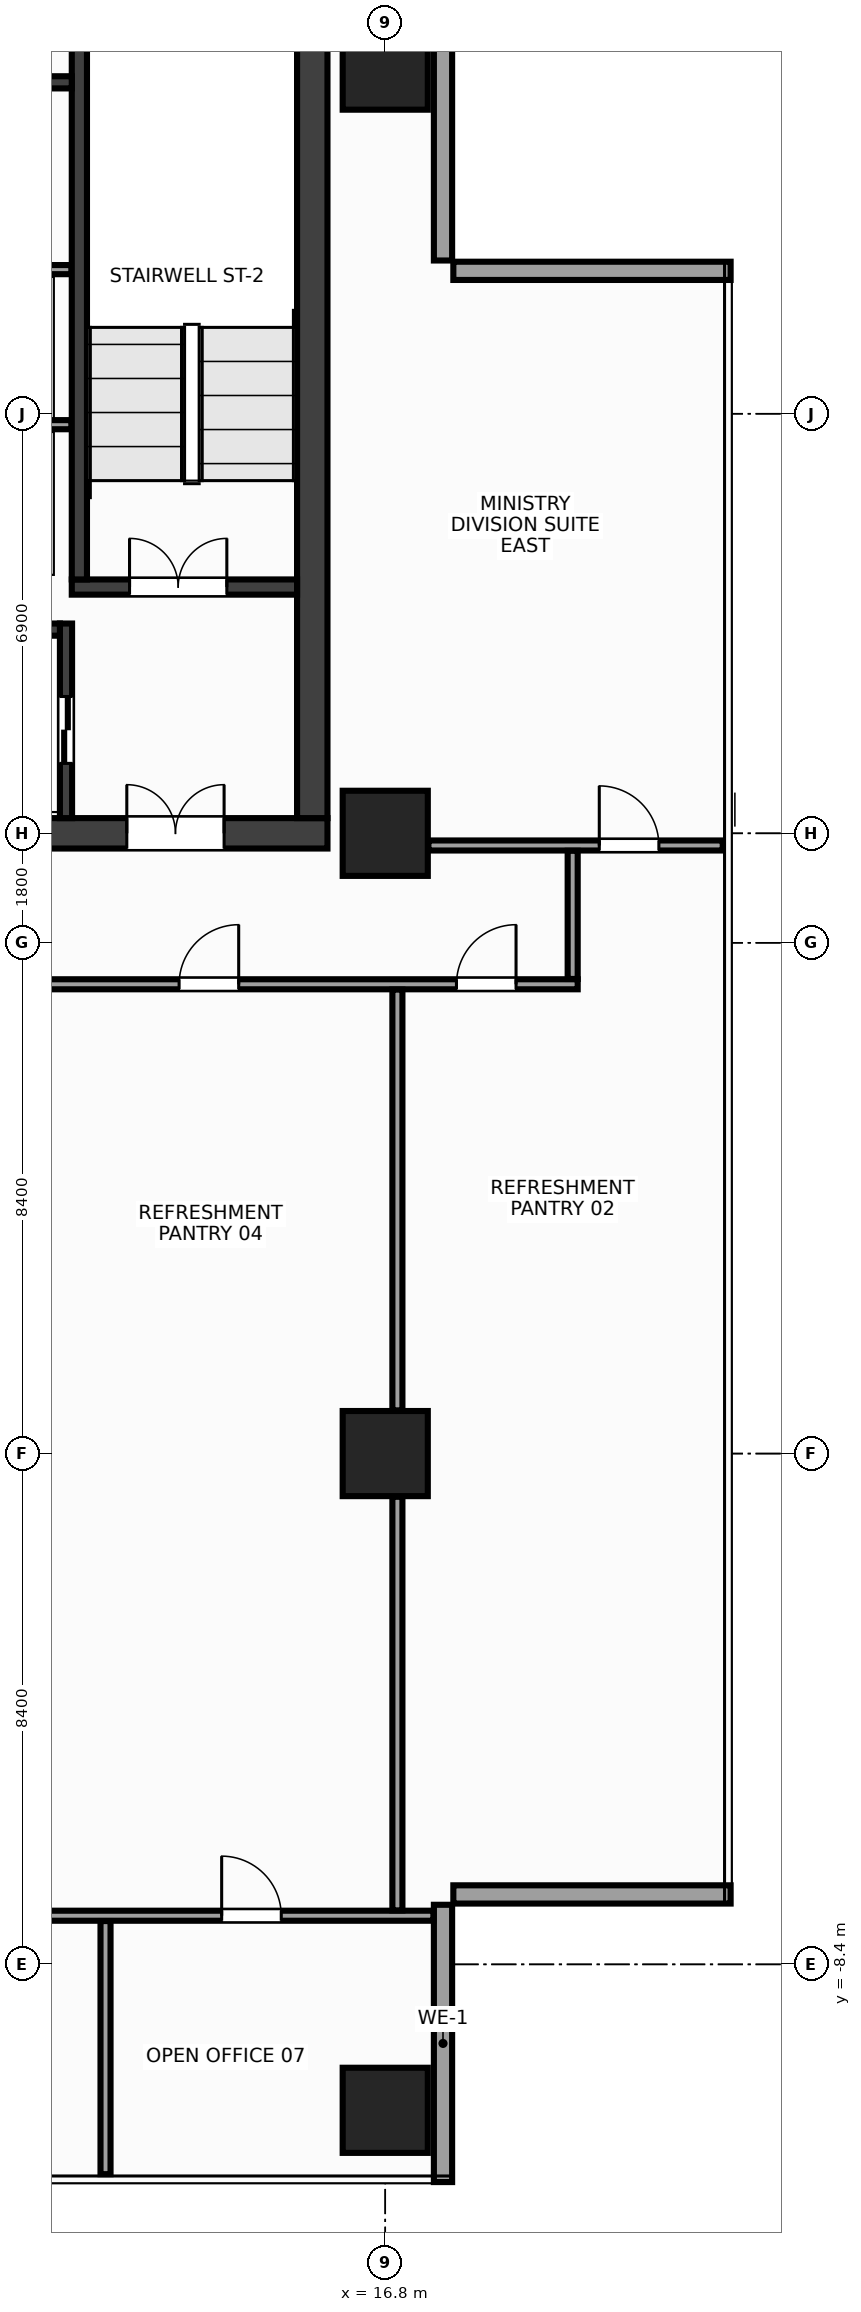
"""IFC4 building model, lengths in metres.
Left out: names, types, materials, properties, quantities, classifications, styles, units other than length and angle.
Written with IfcOpenShell. Run it as: python <this file> out.ifc"""

import sys

from ifc_helpers import new_model, si_unit, direction, frame, frame_2d, origin, origin_2d, place, context, subcontext, project, spatial, rectangle, extrude, source, transform, mapped, element, fill, save


model = new_model("IFC4")
c1 = context("Model", 3, precision=1e-05, world=origin(), true_north=direction((0.0, 1.0)))
c2 = subcontext(c1, "Body", "Model", "MODEL_VIEW")
j1 = project(units=[si_unit("LENGTHUNIT", "METRE"), si_unit("PLANEANGLEUNIT", "RADIAN")], contexts=[c1])
p1 = place(None, origin())
s1 = spatial("IfcSite", under=j1, at=p1, CompositionType="ELEMENT")
p2 = place(p1, origin())
s2 = spatial("IfcBuilding", under=s1, at=p2, CompositionType="ELEMENT")
p3 = place(p2, frame((0.0, 0.0, 254.0)))
s3 = spatial("IfcBuildingStorey", under=s2, at=p3, CompositionType="ELEMENT", Elevation=254.0)
m1 = source(origin(), c2, "Body", "SweptSolid", [
    extrude(rectangle(XDim=31.7, YDim=0.5, at=frame_2d((15.85, 0.0))), origin(), (0.0, 0.0, 1.0), 3.6),
])
p4 = place(p3, frame((-15.85, 10.2, 0.0), z_axis=(0.0, 0.0, 1.0), x_axis=(1.0, 0.0, 0.0)))
e1 = element("IfcWall", 1, at=p4, inside=s3, PredefinedType="SHEAR", context=c2, shape_type="MappedRepresentation", body=[
    mapped(m1, transform((0.0, 0.0, 0.0), x_axis=(1.0, 0.0, 0.0), y_axis=(0.0, 1.0, 0.0), z_axis=(0.0, 0.0, 1.0), scale=1.0)),
])
p5 = place(p4, frame((1.7, 0.0, 0.0)))
e2 = element("IfcOpeningElement", 2, at=p5, cuts=e1, PredefinedType="OPENING", context=c2, shape_type="SweptSolid", body=[
    extrude(rectangle(XDim=1.6, YDim=2.15, at=frame_2d((0.8, 1.075))), frame((0.0, 0.262, 0.0), z_axis=(0.0, -1.0, 0.0), x_axis=(1.0, 0.0, 0.0)), (0.0, 0.0, 1.0), 0.524),
])
p6 = place(p4, frame((28.4, 0.0, 0.0)))
e3 = element("IfcOpeningElement", 3, at=p6, cuts=e1, PredefinedType="OPENING", context=c2, shape_type="SweptSolid", body=[
    extrude(rectangle(XDim=1.6, YDim=2.15, at=frame_2d((0.8, 1.075))), frame((0.0, 0.262, 0.0), z_axis=(0.0, -1.0, 0.0), x_axis=(1.0, 0.0, 0.0)), (0.0, 0.0, 1.0), 0.524),
])
p7 = place(p4, frame((15.1, 0.0, 0.0)))
e4 = element("IfcOpeningElement", 4, at=p7, cuts=e1, PredefinedType="OPENING", context=c2, shape_type="SweptSolid", body=[
    extrude(rectangle(XDim=1.5, YDim=2.2, at=frame_2d((0.75, 1.1))), frame((0.0, 0.262, 0.0), z_axis=(0.0, -1.0, 0.0), x_axis=(1.0, 0.0, 0.0)), (0.0, 0.0, 1.0), 0.524),
])
m2 = source(origin(), c2, "Body", "SweptSolid", [
    extrude(rectangle(XDim=13.1, YDim=0.5, at=frame_2d((6.55, 0.0))), origin(), (0.0, 0.0, 1.0), 3.6),
])
p8 = place(p3, frame((15.6, 10.45, 0.0), z_axis=(0.0, 0.0, 1.0), x_axis=(0.0, 1.0, 0.0)))
e5 = element("IfcWall", 5, at=p8, inside=s3, PredefinedType="SHEAR", context=c2, shape_type="MappedRepresentation", body=[
    mapped(m2, transform((0.0, 0.0, 0.0), x_axis=(1.0, 0.0, 0.0), y_axis=(0.0, 1.0, 0.0), z_axis=(0.0, 0.0, 1.0), scale=1.0)),
])
m3 = source(origin(), c2, "Body", "SweptSolid", [
    extrude(rectangle(XDim=3.705, YDim=0.25, at=frame_2d((1.853, 0.0))), origin(), (0.0, 0.0, 1.0), 3.6),
])
p9 = place(p3, frame((11.645, 14.25, 0.0), z_axis=(0.0, 0.0, 1.0), x_axis=(1.0, 0.0, 0.0)))
e6 = element("IfcWall", 6, at=p9, inside=s3, PredefinedType="SHEAR", context=c2, shape_type="MappedRepresentation", body=[
    mapped(m3, transform((0.0, 0.0, 0.0), x_axis=(1.0, 0.0, 0.0), y_axis=(0.0, 1.0, 0.0), z_axis=(0.0, 0.0, 1.0), scale=1.0)),
])
p10 = place(p9, frame((0.95, 0.0, 0.0)))
e7 = element("IfcOpeningElement", 7, at=p10, cuts=e6, PredefinedType="OPENING", context=c2, shape_type="SweptSolid", body=[
    extrude(rectangle(XDim=1.6, YDim=2.15, at=frame_2d((0.8, 1.075))), frame((0.0, 0.137, 0.0), z_axis=(0.0, -1.0, 0.0), x_axis=(1.0, 0.0, 0.0)), (0.0, 0.0, 1.0), 0.274),
])
m4 = source(origin(), c2, "Body", "SweptSolid", [
    extrude(rectangle(XDim=9.175, YDim=0.25, at=frame_2d((4.587, 0.0))), origin(), (0.0, 0.0, 1.0), 3.6),
])
p11 = place(p3, frame((11.77, 14.375, 0.0), z_axis=(0.0, 0.0, 1.0), x_axis=(0.0, 1.0, 0.0)))
e8 = element("IfcWall", 8, at=p11, inside=s3, PredefinedType="SHEAR", context=c2, shape_type="MappedRepresentation", body=[
    mapped(m4, transform((0.0, 0.0, 0.0), x_axis=(1.0, 0.0, 0.0), y_axis=(0.0, 1.0, 0.0), z_axis=(0.0, 0.0, 1.0), scale=1.0)),
])
m5 = source(origin(), c2, "Body", "SweptSolid", [
    extrude(rectangle(XDim=3.2, YDim=0.2, at=frame_2d((1.6, 0.0))), origin(), (0.0, 0.0, 1.0), 3.6),
])
p12 = place(p3, frame((11.55, 10.45, 0.0), z_axis=(0.0, 0.0, 1.0), x_axis=(0.0, 1.0, 0.0)))
e9 = element("IfcWall", 9, at=p12, inside=s3, PredefinedType="SHEAR", context=c2, shape_type="MappedRepresentation", body=[
    mapped(m5, transform((0.0, 0.0, 0.0), x_axis=(1.0, 0.0, 0.0), y_axis=(0.0, 1.0, 0.0), z_axis=(0.0, 0.0, 1.0), scale=1.0)),
])
p13 = place(p12, frame((0.9, 0.0, 0.0)))
e10 = element("IfcOpeningElement", 10, at=p13, cuts=e9, PredefinedType="OPENING", context=c2, shape_type="SweptSolid", body=[
    extrude(rectangle(XDim=1.1, YDim=2.15, at=frame_2d((0.55, 1.075))), frame((0.0, 0.112, 0.0), z_axis=(0.0, -1.0, 0.0), x_axis=(1.0, 0.0, 0.0)), (0.0, 0.0, 1.0), 0.224),
])
m6 = source(origin(), c2, "Body", "SweptSolid", [
    extrude(rectangle(XDim=2.825, YDim=0.2, at=frame_2d((1.413, 0.0))), origin(), (0.0, 0.0, 1.0), 3.6),
])
p14 = place(p3, frame((8.625, 13.55, 0.0), z_axis=(0.0, 0.0, 1.0), x_axis=(1.0, 0.0, 0.0)))
e11 = element("IfcWall", 11, at=p14, inside=s3, PredefinedType="SHEAR", context=c2, shape_type="MappedRepresentation", body=[
    mapped(m6, transform((0.0, 0.0, 0.0), x_axis=(1.0, 0.0, 0.0), y_axis=(0.0, 1.0, 0.0), z_axis=(0.0, 0.0, 1.0), scale=1.0)),
])
m7 = source(origin(), c2, "Body", "SweptSolid", [
    extrude(rectangle(XDim=3.02, YDim=0.2, at=frame_2d((1.51, 0.0))), origin(), (0.0, 0.0, 1.0), 3.6),
])
p15 = place(p3, frame((8.625, 22.55, 0.0), z_axis=(0.0, 0.0, 1.0), x_axis=(1.0, 0.0, 0.0)))
e12 = element("IfcWall", 12, at=p15, inside=s3, PredefinedType="SHEAR", context=c2, shape_type="MappedRepresentation", body=[
    mapped(m7, transform((0.0, 0.0, 0.0), x_axis=(1.0, 0.0, 0.0), y_axis=(0.0, 1.0, 0.0), z_axis=(0.0, 0.0, 1.0), scale=1.0)),
])
m8 = source(origin(), c2, "Body", "SweptSolid", [
    extrude(rectangle(XDim=1.4, YDim=1.4, at=origin_2d()), origin(), (0.0, 0.0, 1.0), 3.6),
])
for number, where, z_axis, x_axis in (
    (13, (16.8, -10.8, 0.0), (0.0, 0.0, 1.0), (1.0, 0.0, 0.0)),
    (14, (16.8, 0.0, 0.0), (0.0, 0.0, 1.0), (1.0, 0.0, 0.0)),
    (15, (16.8, 10.2, 0.0), (0.0, 0.0, 1.0), (1.0, 0.0, 0.0)),
    (16, (16.8, 22.8, 0.0), (0.0, 0.0, 1.0), (1.0, 0.0, 0.0)),
):
    element("IfcColumn", number, at=place(p3, frame(where, z_axis=z_axis, x_axis=x_axis)), inside=s3, PredefinedType="COLUMN", context=c2, shape_type="MappedRepresentation", body=[
        mapped(m8, transform((0.0, 0.0, 0.0), x_axis=(1.0, 0.0, 0.0), y_axis=(0.0, 1.0, 0.0), z_axis=(0.0, 0.0, 1.0), scale=1.0)),
    ])
m9 = source(origin(), c2, "Body", "SweptSolid", [
    extrude(rectangle(XDim=4.56, YDim=0.3, at=frame_2d((2.28, 0.0))), origin(), (0.0, 0.0, 1.0), 2.75),
])
for number, where, z_axis, x_axis in (
    (17, (17.75, -11.98, 0.0), (0.0, 0.0, 1.0), (0.0, 1.0, 0.0)),
    (18, (17.92, -7.25, 0.0), (0.0, 0.0, 1.0), (1.0, 0.0, 0.0)),
    (19, (22.48, 19.45, 0.0), (0.0, 0.0, 1.0), (-1.0, 0.0, 0.0)),
):
    element("IfcWall", number, at=place(p3, frame(where, z_axis=z_axis, x_axis=x_axis)), inside=s3, PredefinedType="STANDARD", context=c2, shape_type="MappedRepresentation", body=[
        mapped(m9, transform((0.0, 0.0, 0.0), x_axis=(1.0, 0.0, 0.0), y_axis=(0.0, 1.0, 0.0), z_axis=(0.0, 0.0, 1.0), scale=1.0)),
    ])
m10 = source(origin(), c2, "Body", "SweptSolid", [
    extrude(rectangle(XDim=4.56, YDim=0.3, at=frame_2d((2.28, 0.0))), origin(), (0.0, 0.0, 1.0), 2.75),
])
p16 = place(p3, frame((17.75, 19.62, 0.0), z_axis=(0.0, 0.0, 1.0), x_axis=(0.0, 1.0, 0.0)))
e20 = element("IfcWall", 20, at=p16, inside=s3, PredefinedType="STANDARD", context=c2, shape_type="MappedRepresentation", body=[
    mapped(m10, transform((0.0, 0.0, 0.0), x_axis=(1.0, 0.0, 0.0), y_axis=(0.0, 1.0, 0.0), z_axis=(0.0, 0.0, 1.0), scale=1.0)),
])
m11 = source(origin(), c2, "Body", "SweptSolid", [
    extrude(rectangle(XDim=3.01, YDim=0.15, at=frame_2d((1.505, 0.0))), origin(), (0.0, 0.0, 1.0), 3.37),
])
for number, where, z_axis, x_axis in (
    (21, (8.63, 16.92, 0.0), (0.0, 0.0, 1.0), (1.0, 0.0, 0.0)),
    (22, (8.63, 19.47, 0.0), (0.0, 0.0, 1.0), (1.0, 0.0, 0.0)),
):
    element("IfcWall", number, at=place(p3, frame(where, z_axis=z_axis, x_axis=x_axis)), inside=s3, PredefinedType="PARTITIONING", context=c2, shape_type="MappedRepresentation", body=[
        mapped(m11, transform((0.0, 0.0, 0.0), x_axis=(1.0, 0.0, 0.0), y_axis=(0.0, 1.0, 0.0), z_axis=(0.0, 0.0, 1.0), scale=1.0)),
    ])
m12 = source(origin(), c2, "Body", "SweptSolid", [
    extrude(rectangle(XDim=4.84, YDim=0.165, at=frame_2d((2.42, 0.0))), origin(), (0.0, 0.0, 1.0), 3.37),
])
p17 = place(p3, frame((17.51, 10.0, 0.0), z_axis=(0.0, 0.0, 1.0), x_axis=(1.0, 0.0, 0.0)))
e23 = element("IfcWall", 23, at=p17, inside=s3, PredefinedType="PARTITIONING", context=c2, shape_type="MappedRepresentation", body=[
    mapped(m12, transform((0.0, 0.0, 0.0), x_axis=(1.0, 0.0, 0.0), y_axis=(0.0, 1.0, 0.0), z_axis=(0.0, 0.0, 1.0), scale=1.0)),
])
p18 = place(p17, frame((2.81, 0.0, 0.0)))
e24 = element("IfcOpeningElement", 24, at=p18, cuts=e23, PredefinedType="OPENING", context=c2, shape_type="SweptSolid", body=[
    extrude(rectangle(XDim=0.98, YDim=2.15, at=frame_2d((0.49, 1.075))), frame((0.0, 0.094, 0.0), z_axis=(0.0, -1.0, 0.0), x_axis=(1.0, 0.0, 0.0)), (0.0, 0.0, 1.0), 0.189),
])
m13 = source(origin(), c2, "Body", "SweptSolid", [
    extrude(rectangle(XDim=21.9, YDim=0.165, at=frame_2d((10.95, 0.0))), origin(), (0.0, 0.0, 1.0), 2.755),
])
p19 = place(p3, frame((-1.935, 7.718, 0.0), z_axis=(0.0, 0.0, 1.0), x_axis=(1.0, 0.0, 0.0)))
e25 = element("IfcWall", 25, at=p19, inside=s3, PredefinedType="PARTITIONING", context=c2, shape_type="MappedRepresentation", body=[
    mapped(m13, transform((0.0, 0.0, 0.0), x_axis=(1.0, 0.0, 0.0), y_axis=(0.0, 1.0, 0.0), z_axis=(0.0, 0.0, 1.0), scale=1.0)),
])
p20 = place(p19, frame((19.906, 0.0, 0.0)))
e26 = element("IfcOpeningElement", 26, at=p20, cuts=e25, PredefinedType="OPENING", context=c2, shape_type="SweptSolid", body=[
    extrude(rectangle(XDim=0.98, YDim=2.15, at=frame_2d((0.49, 1.075))), frame((0.0, 0.094, 0.0), z_axis=(0.0, -1.0, 0.0), x_axis=(1.0, 0.0, 0.0)), (0.0, 0.0, 1.0), 0.189),
])
p21 = place(p19, frame((15.345, 0.0, 0.0)))
e27 = element("IfcOpeningElement", 27, at=p21, cuts=e25, PredefinedType="OPENING", context=c2, shape_type="SweptSolid", body=[
    extrude(rectangle(XDim=0.98, YDim=2.15, at=frame_2d((0.49, 1.075))), frame((0.0, 0.094, 0.0), z_axis=(0.0, -1.0, 0.0), x_axis=(1.0, 0.0, 0.0)), (0.0, 0.0, 1.0), 0.189),
])
m14 = source(origin(), c2, "Body", "SweptSolid", [
    extrude(rectangle(XDim=2.108, YDim=0.165, at=frame_2d((1.054, 0.0))), origin(), (0.0, 0.0, 1.0), 3.37),
])
p22 = place(p3, frame((19.883, 7.805, 0.0), z_axis=(0.0, 0.0, 1.0), x_axis=(0.0, 1.0, 0.0)))
e28 = element("IfcWall", 28, at=p22, inside=s3, PredefinedType="PARTITIONING", context=c2, shape_type="MappedRepresentation", body=[
    mapped(m14, transform((0.0, 0.0, 0.0), x_axis=(1.0, 0.0, 0.0), y_axis=(0.0, 1.0, 0.0), z_axis=(0.0, 0.0, 1.0), scale=1.0)),
])
m15 = source(origin(), c2, "Body", "SweptSolid", [
    extrude(rectangle(XDim=35.184, YDim=0.165, at=frame_2d((17.592, 0.0))), origin(), (0.0, 0.0, 1.0), 2.755),
])
p23 = place(p3, frame((-17.592, -7.6, 0.0), z_axis=(0.0, 0.0, 1.0), x_axis=(1.0, 0.0, 0.0)))
e29 = element("IfcWall", 29, at=p23, inside=s3, PredefinedType="PARTITIONING", context=c2, shape_type="MappedRepresentation", body=[
    mapped(m15, transform((0.0, 0.0, 0.0), x_axis=(1.0, 0.0, 0.0), y_axis=(0.0, 1.0, 0.0), z_axis=(0.0, 0.0, 1.0), scale=1.0)),
])
p24 = place(p23, frame((2.402, 0.0, 0.0)))
e30 = element("IfcOpeningElement", 30, at=p24, cuts=e29, PredefinedType="OPENING", context=c2, shape_type="SweptSolid", body=[
    extrude(rectangle(XDim=0.98, YDim=2.15, at=frame_2d((0.49, 1.075))), frame((0.0, 0.094, 0.0), z_axis=(0.0, -1.0, 0.0), x_axis=(1.0, 0.0, 0.0)), (0.0, 0.0, 1.0), 0.189),
])
p25 = place(p23, frame((31.702, 0.0, 0.0)))
e31 = element("IfcOpeningElement", 31, at=p25, cuts=e29, PredefinedType="OPENING", context=c2, shape_type="SweptSolid", body=[
    extrude(rectangle(XDim=0.98, YDim=2.15, at=frame_2d((0.49, 1.075))), frame((0.0, 0.094, 0.0), z_axis=(0.0, -1.0, 0.0), x_axis=(1.0, 0.0, 0.0)), (0.0, 0.0, 1.0), 0.189),
])
p26 = place(p23, frame((9.102, 0.0, 0.0)))
e32 = element("IfcOpeningElement", 32, at=p26, cuts=e29, PredefinedType="OPENING", context=c2, shape_type="SweptSolid", body=[
    extrude(rectangle(XDim=0.98, YDim=2.15, at=frame_2d((0.49, 1.075))), frame((0.0, 0.094, 0.0), z_axis=(0.0, -1.0, 0.0), x_axis=(1.0, 0.0, 0.0)), (0.0, 0.0, 1.0), 0.189),
])
p27 = place(p23, frame((16.302, 0.0, 0.0)))
e33 = element("IfcOpeningElement", 33, at=p27, cuts=e29, PredefinedType="OPENING", context=c2, shape_type="SweptSolid", body=[
    extrude(rectangle(XDim=0.98, YDim=2.15, at=frame_2d((0.49, 1.075))), frame((0.0, 0.094, 0.0), z_axis=(0.0, -1.0, 0.0), x_axis=(1.0, 0.0, 0.0)), (0.0, 0.0, 1.0), 0.189),
])
p28 = place(p23, frame((24.302, 0.0, 0.0)))
e34 = element("IfcOpeningElement", 34, at=p28, cuts=e29, PredefinedType="OPENING", context=c2, shape_type="SweptSolid", body=[
    extrude(rectangle(XDim=0.98, YDim=2.15, at=frame_2d((0.49, 1.075))), frame((0.0, 0.094, 0.0), z_axis=(0.0, -1.0, 0.0), x_axis=(1.0, 0.0, 0.0)), (0.0, 0.0, 1.0), 0.189),
])
m16 = source(origin(), c2, "Body", "SweptSolid", [
    extrude(rectangle(XDim=6.802, YDim=0.165, at=frame_2d((3.401, 0.0))), origin(), (0.0, 0.0, 1.0), 2.755),
])
p29 = place(p3, frame((17.0, -7.512, 0.0), z_axis=(0.0, 0.0, 1.0), x_axis=(0.0, 1.0, 0.0)))
e35 = element("IfcWall", 35, at=p29, inside=s3, PredefinedType="PARTITIONING", context=c2, shape_type="MappedRepresentation", body=[
    mapped(m16, transform((0.0, 0.0, 0.0), x_axis=(1.0, 0.0, 0.0), y_axis=(0.0, 1.0, 0.0), z_axis=(0.0, 0.0, 1.0), scale=1.0)),
])
m17 = source(origin(), c2, "Body", "SweptSolid", [
    extrude(rectangle(XDim=6.92, YDim=0.165, at=frame_2d((3.46, 0.0))), origin(), (0.0, 0.0, 1.0), 2.755),
])
p30 = place(p3, frame((17.0, 0.71, 0.0), z_axis=(0.0, 0.0, 1.0), x_axis=(0.0, 1.0, 0.0)))
e36 = element("IfcWall", 36, at=p30, inside=s3, PredefinedType="PARTITIONING", context=c2, shape_type="MappedRepresentation", body=[
    mapped(m17, transform((0.0, 0.0, 0.0), x_axis=(1.0, 0.0, 0.0), y_axis=(0.0, 1.0, 0.0), z_axis=(0.0, 0.0, 1.0), scale=1.0)),
])
m18 = source(origin(), c2, "Body", "SweptSolid", [
    extrude(rectangle(XDim=4.163, YDim=0.165, at=frame_2d((2.081, 0.0))), origin(), (0.0, 0.0, 1.0), 2.905),
])
p31 = place(p3, frame((12.2, -11.85, 0.0), z_axis=(0.0, 0.0, 1.0), x_axis=(0.0, 1.0, 0.0)))
e37 = element("IfcWall", 37, at=p31, inside=s3, PredefinedType="PARTITIONING", context=c2, shape_type="MappedRepresentation", body=[
    mapped(m18, transform((0.0, 0.0, 0.0), x_axis=(1.0, 0.0, 0.0), y_axis=(0.0, 1.0, 0.0), z_axis=(0.0, 0.0, 1.0), scale=1.0)),
])
m19 = source(origin(), c2, "Body", "SweptSolid", [
    extrude(rectangle(XDim=1.6, YDim=2.15, at=frame_2d((0.8, 1.075))), frame((0.0, 0.025, 0.0), z_axis=(0.0, -1.0, 0.0), x_axis=(1.0, 0.0, 0.0)), (0.0, 0.0, 1.0), 0.05),
])
p32 = place(p10, origin())
e38 = element("IfcDoor", 38, at=p32, inside=s3, OperationType="DOUBLE_DOOR_SINGLE_SWING", PredefinedType="DOOR", context=c2, shape_type="MappedRepresentation", body=[
    mapped(m19, transform((0.0, 0.0, 0.0), x_axis=(1.0, 0.0, 0.0), y_axis=(0.0, 1.0, 0.0), z_axis=(0.0, 0.0, 1.0), scale=1.0)),
])
fill(e7, e38)
p33 = place(p6, origin())
e39 = element("IfcDoor", 39, at=p33, inside=s3, OperationType="DOUBLE_DOOR_SINGLE_SWING", PredefinedType="DOOR", context=c2, shape_type="MappedRepresentation", body=[
    mapped(m19, transform((0.0, 0.0, 0.0), x_axis=(1.0, 0.0, 0.0), y_axis=(0.0, 1.0, 0.0), z_axis=(0.0, 0.0, 1.0), scale=1.0)),
])
fill(e3, e39)
m20 = source(origin(), c2, "Body", "SweptSolid", [
    extrude(rectangle(XDim=1.1, YDim=2.15, at=frame_2d((0.55, 1.075))), frame((0.0, 0.025, 0.0), z_axis=(0.0, -1.0, 0.0), x_axis=(1.0, 0.0, 0.0)), (0.0, 0.0, 1.0), 0.05),
])
p34 = place(p13, origin())
e40 = element("IfcDoor", 40, at=p34, inside=s3, OperationType="DOUBLE_DOOR_SLIDING", PredefinedType="DOOR", context=c2, shape_type="MappedRepresentation", body=[
    mapped(m20, transform((0.0, 0.0, 0.0), x_axis=(1.0, 0.0, 0.0), y_axis=(0.0, 1.0, 0.0), z_axis=(0.0, 0.0, 1.0), scale=1.0)),
])
fill(e10, e40)
m21 = source(origin(), c2, "Body", "SweptSolid", [
    extrude(rectangle(XDim=0.98, YDim=2.15, at=frame_2d((0.49, 1.075))), frame((0.0, 0.025, 0.0), z_axis=(0.0, -1.0, 0.0), x_axis=(1.0, 0.0, 0.0)), (0.0, 0.0, 1.0), 0.05),
])
p35 = place(p20, origin())
e41 = element("IfcDoor", 41, at=p35, inside=s3, OperationType="SINGLE_SWING_RIGHT", PredefinedType="DOOR", context=c2, shape_type="MappedRepresentation", body=[
    mapped(m21, transform((0.0, 0.0, 0.0), x_axis=(1.0, 0.0, 0.0), y_axis=(0.0, 1.0, 0.0), z_axis=(0.0, 0.0, 1.0), scale=1.0)),
])
fill(e26, e41)
p36 = place(p21, origin())
e42 = element("IfcDoor", 42, at=p36, inside=s3, OperationType="SINGLE_SWING_RIGHT", PredefinedType="DOOR", context=c2, shape_type="MappedRepresentation", body=[
    mapped(m21, transform((0.0, 0.0, 0.0), x_axis=(1.0, 0.0, 0.0), y_axis=(0.0, 1.0, 0.0), z_axis=(0.0, 0.0, 1.0), scale=1.0)),
])
fill(e27, e42)
p37 = place(p18, origin())
e43 = element("IfcDoor", 43, at=p37, inside=s3, OperationType="SINGLE_SWING_LEFT", PredefinedType="DOOR", context=c2, shape_type="MappedRepresentation", body=[
    mapped(m21, transform((0.0, 0.0, 0.0), x_axis=(1.0, 0.0, 0.0), y_axis=(0.0, 1.0, 0.0), z_axis=(0.0, 0.0, 1.0), scale=1.0)),
])
fill(e24, e43)
p38 = place(p25, origin())
e44 = element("IfcDoor", 44, at=p38, inside=s3, OperationType="SINGLE_SWING_LEFT", PredefinedType="DOOR", context=c2, shape_type="MappedRepresentation", body=[
    mapped(m21, transform((0.0, 0.0, 0.0), x_axis=(1.0, 0.0, 0.0), y_axis=(0.0, 1.0, 0.0), z_axis=(0.0, 0.0, 1.0), scale=1.0)),
])
fill(e31, e44)
save(model, sys.argv[1])
